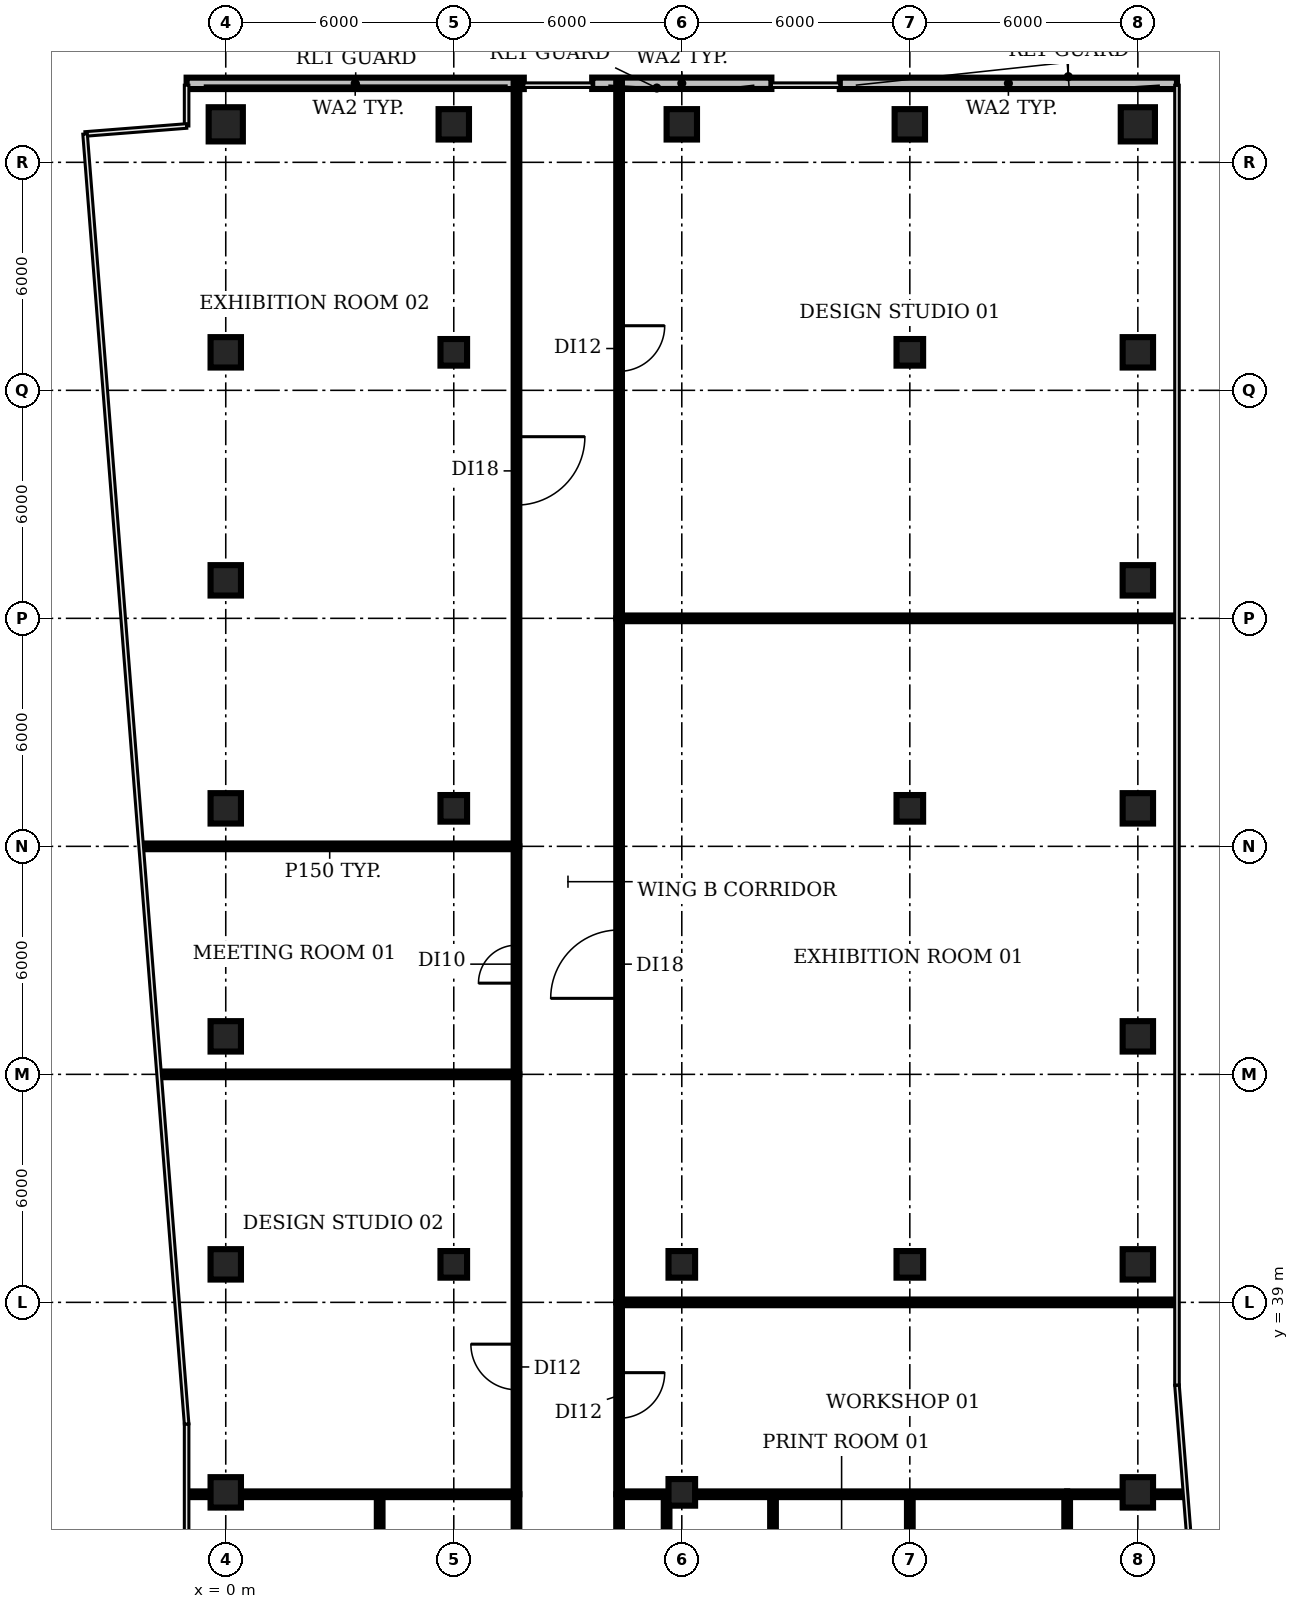
"""IFC4 building model, lengths in metres.
Left out: names, types, materials, properties, quantities, classifications, styles, units other than length and angle.
Written with IfcOpenShell. Run it as: python <this file> out.ifc"""

import sys

from ifc_helpers import new_model, si_unit, direction, frame, frame_2d, origin, origin_2d, place, context, subcontext, project, spatial, rectangle, circle, extrude, element, fill, save


model = new_model("IFC4")
c1 = context("Model", 3, precision=1e-05, world=origin(), true_north=direction((0.0, 1.0)))
c2 = subcontext(c1, "Body", "Model", "MODEL_VIEW")
j1 = project(units=[si_unit("LENGTHUNIT", "METRE"), si_unit("PLANEANGLEUNIT", "RADIAN")], contexts=[c1])
p1 = place(None, origin())
s1 = spatial("IfcSite", under=j1, at=p1, CompositionType="ELEMENT")
p2 = place(p1, origin())
s2 = spatial("IfcBuilding", under=s1, at=p2, CompositionType="ELEMENT")
p3 = place(p2, frame((0.0, 0.0, 209.6)))
s3 = spatial("IfcBuildingStorey", under=s2, at=p3, CompositionType="ELEMENT", Elevation=209.6)
for number, where, z_axis, x_axis in (
    (1, (0.0, 34.0, 0.0), (0.0, 0.0, 1.0), (1.0, 0.0, 0.0)),
    (2, (0.0, 40.0, 0.0), (0.0, 0.0, 1.0), (1.0, 0.0, 0.0)),
    (3, (0.0, 46.0, 0.0), (0.0, 0.0, 1.0), (1.0, 0.0, 0.0)),
    (4, (0.0, 52.0, 0.0), (0.0, 0.0, 1.0), (1.0, 0.0, 0.0)),
    (5, (0.0, 58.0, 0.0), (0.0, 0.0, 1.0), (1.0, 0.0, 0.0)),
    (6, (0.0, 64.0, 0.0), (0.0, 0.0, 1.0), (1.0, 0.0, 0.0)),
):
    element("IfcColumn", number, at=place(p3, frame(where, z_axis=z_axis, x_axis=x_axis)), inside=s3, PredefinedType="COLUMN", context=c2, shape_type="SweptSolid", body=[
        extrude(rectangle(XDim=0.8, YDim=0.8, at=origin_2d()), origin(), (0.0, 0.0, 1.0), 3.8),
    ])
p4 = place(p3, frame((0.0, 70.0, 0.0), z_axis=(0.0, 0.0, 1.0), x_axis=(1.0, 0.0, 0.0)))
e7 = element("IfcColumn", 7, at=p4, inside=s3, PredefinedType="COLUMN", context=c2, shape_type="SweptSolid", body=[
    extrude(circle(Radius=0.45, at=origin_2d()), origin(), (0.0, 0.0, 1.0), 3.8),
])
for number, where, z_axis, x_axis in (
    (8, (6.0, 40.0, 0.0), (0.0, 0.0, 1.0), (1.0, 0.0, 0.0)),
    (9, (6.0, 52.0, 0.0), (0.0, 0.0, 1.0), (1.0, 0.0, 0.0)),
    (10, (6.0, 64.0, 0.0), (0.0, 0.0, 1.0), (1.0, 0.0, 0.0)),
):
    element("IfcColumn", number, at=place(p3, frame(where, z_axis=z_axis, x_axis=x_axis)), inside=s3, PredefinedType="COLUMN", context=c2, shape_type="SweptSolid", body=[
        extrude(rectangle(XDim=0.7, YDim=0.7, at=origin_2d()), origin(), (0.0, 0.0, 1.0), 3.8),
    ])
p5 = place(p3, frame((6.0, 70.0, 0.0), z_axis=(0.0, 0.0, 1.0), x_axis=(1.0, 0.0, 0.0)))
e11 = element("IfcColumn", 11, at=p5, inside=s3, PredefinedType="COLUMN", context=c2, shape_type="SweptSolid", body=[
    extrude(rectangle(XDim=0.8, YDim=0.8, at=origin_2d()), origin(), (0.0, 0.0, 1.0), 3.8),
])
for number, where, z_axis, x_axis in (
    (12, (12.0, 34.0, 0.0), (0.0, 0.0, 1.0), (1.0, 0.0, 0.0)),
    (13, (12.0, 40.0, 0.0), (0.0, 0.0, 1.0), (1.0, 0.0, 0.0)),
):
    element("IfcColumn", number, at=place(p3, frame(where, z_axis=z_axis, x_axis=x_axis)), inside=s3, PredefinedType="COLUMN", context=c2, shape_type="SweptSolid", body=[
        extrude(rectangle(XDim=0.7, YDim=0.7, at=origin_2d()), origin(), (0.0, 0.0, 1.0), 3.8),
    ])
p6 = place(p3, frame((12.0, 70.0, 0.0), z_axis=(0.0, 0.0, 1.0), x_axis=(1.0, 0.0, 0.0)))
e14 = element("IfcColumn", 14, at=p6, inside=s3, PredefinedType="COLUMN", context=c2, shape_type="SweptSolid", body=[
    extrude(rectangle(XDim=0.8, YDim=0.8, at=origin_2d()), origin(), (0.0, 0.0, 1.0), 3.8),
])
for number, where, z_axis, x_axis in (
    (15, (18.0, 40.0, 0.0), (0.0, 0.0, 1.0), (1.0, 0.0, 0.0)),
    (16, (18.0, 52.0, 0.0), (0.0, 0.0, 1.0), (1.0, 0.0, 0.0)),
    (17, (18.0, 64.0, 0.0), (0.0, 0.0, 1.0), (1.0, 0.0, 0.0)),
):
    element("IfcColumn", number, at=place(p3, frame(where, z_axis=z_axis, x_axis=x_axis)), inside=s3, PredefinedType="COLUMN", context=c2, shape_type="SweptSolid", body=[
        extrude(rectangle(XDim=0.7, YDim=0.7, at=origin_2d()), origin(), (0.0, 0.0, 1.0), 3.8),
    ])
for number, where, z_axis, x_axis in (
    (18, (18.0, 70.0, 0.0), (0.0, 0.0, 1.0), (1.0, 0.0, 0.0)),
    (19, (24.0, 34.0, 0.0), (0.0, 0.0, 1.0), (1.0, 0.0, 0.0)),
    (20, (24.0, 40.0, 0.0), (0.0, 0.0, 1.0), (1.0, 0.0, 0.0)),
    (21, (24.0, 46.0, 0.0), (0.0, 0.0, 1.0), (1.0, 0.0, 0.0)),
    (22, (24.0, 52.0, 0.0), (0.0, 0.0, 1.0), (1.0, 0.0, 0.0)),
    (23, (24.0, 58.0, 0.0), (0.0, 0.0, 1.0), (1.0, 0.0, 0.0)),
    (24, (24.0, 64.0, 0.0), (0.0, 0.0, 1.0), (1.0, 0.0, 0.0)),
):
    element("IfcColumn", number, at=place(p3, frame(where, z_axis=z_axis, x_axis=x_axis)), inside=s3, PredefinedType="COLUMN", context=c2, shape_type="SweptSolid", body=[
        extrude(rectangle(XDim=0.8, YDim=0.8, at=origin_2d()), origin(), (0.0, 0.0, 1.0), 3.8),
    ])
p7 = place(p3, frame((24.0, 70.0, 0.0), z_axis=(0.0, 0.0, 1.0), x_axis=(1.0, 0.0, 0.0)))
e25 = element("IfcColumn", 25, at=p7, inside=s3, PredefinedType="COLUMN", context=c2, shape_type="SweptSolid", body=[
    extrude(circle(Radius=0.45, at=origin_2d()), origin(), (0.0, 0.0, 1.0), 3.8),
])
p8 = place(p3, frame((25.03, 71.078, 0.0), z_axis=(0.0, 0.0, 1.0), x_axis=(-1.0, 0.0, 0.0)))
e26 = element("IfcWall", 26, at=p8, inside=s3, PredefinedType="SOLIDWALL", context=c2, shape_type="SweptSolid", body=[
    extrude(rectangle(XDim=8.873, YDim=0.3, at=frame_2d((4.436, 0.0))), origin(), (0.0, 0.0, 1.0), 3.8),
])
p9 = place(p3, frame((14.357, 71.08, 0.0), z_axis=(0.0, 0.0, 1.0), x_axis=(-1.0, 0.0, 0.0)))
e27 = element("IfcWall", 27, at=p9, inside=s3, PredefinedType="SOLIDWALL", context=c2, shape_type="SweptSolid", body=[
    extrude(rectangle(XDim=4.715, YDim=0.3, at=frame_2d((2.357, 0.0))), origin(), (0.0, 0.0, 1.0), 3.8),
])
p10 = place(p3, frame((7.843, 71.078, 0.0), z_axis=(0.0, 0.0, 1.0), x_axis=(-1.0, 0.0, 0.0)))
e28 = element("IfcWall", 28, at=p10, inside=s3, PredefinedType="SOLIDWALL", context=c2, shape_type="SweptSolid", body=[
    extrude(rectangle(XDim=8.873, YDim=0.3, at=frame_2d((4.436, 0.0))), origin(), (0.0, 0.0, 1.0), 3.8),
])
p11 = place(p3, frame((-2.18, 51.0, 0.0), z_axis=(0.0, 0.0, 1.0), x_axis=(1.0, 0.0, 0.0)))
e29 = element("IfcWall", 29, at=p11, inside=s3, PredefinedType="PARTITIONING", context=c2, shape_type="SweptSolid", body=[
    extrude(rectangle(XDim=9.83, YDim=0.15, at=frame_2d((4.915, 0.0))), origin(), (0.0, 0.0, 1.0), 2.83),
])
p12 = place(p3, frame((-1.7, 45.0, 0.0), z_axis=(0.0, 0.0, 1.0), x_axis=(1.0, 0.0, 0.0)))
e30 = element("IfcWall", 30, at=p12, inside=s3, PredefinedType="PARTITIONING", context=c2, shape_type="SweptSolid", body=[
    extrude(rectangle(XDim=9.35, YDim=0.15, at=frame_2d((4.675, 0.0))), origin(), (0.0, 0.0, 1.0), 2.83),
])
p13 = place(p3, frame((-0.98, 33.95, 0.0), z_axis=(0.0, 0.0, 1.0), x_axis=(1.0, 0.0, 0.0)))
e31 = element("IfcWall", 31, at=p13, inside=s3, PredefinedType="PARTITIONING", context=c2, shape_type="SweptSolid", body=[
    extrude(rectangle(XDim=8.63, YDim=0.15, at=frame_2d((4.315, 0.0))), origin(), (0.0, 0.0, 1.0), 2.83),
])
p14 = place(p3, frame((4.05, 29.15, 0.0), z_axis=(0.0, 0.0, 1.0), x_axis=(0.0, 1.0, 0.0)))
e32 = element("IfcWall", 32, at=p14, inside=s3, PredefinedType="PARTITIONING", context=c2, shape_type="SweptSolid", body=[
    extrude(rectangle(XDim=4.8, YDim=0.15, at=frame_2d((2.4, 0.0))), origin(), (0.0, 0.0, 1.0), 2.83),
])
p15 = place(p3, frame((7.65, 29.15, 0.0), z_axis=(0.0, 0.0, 1.0), x_axis=(0.0, 1.0, 0.0)))
e33 = element("IfcWall", 33, at=p15, inside=s3, PredefinedType="PARTITIONING", context=c2, shape_type="SweptSolid", body=[
    extrude(rectangle(XDim=4.8, YDim=0.15, at=frame_2d((2.4, 0.0))), origin(), (0.0, 0.0, 1.0), 2.83),
])
p16 = place(p15, frame((1.9, 0.0, 0.0)))
e34 = element("IfcOpeningElement", 34, at=p16, cuts=e33, PredefinedType="OPENING", context=c2, shape_type="SweptSolid", body=[
    extrude(rectangle(XDim=0.9, YDim=2.1, at=frame_2d((0.45, 1.05))), frame((0.0, 0.085, 0.0), z_axis=(0.0, -1.0, 0.0), x_axis=(1.0, 0.0, 0.0)), (0.0, 0.0, 1.0), 0.17),
])
p17 = place(p3, frame((7.65, 33.95, 0.0), z_axis=(0.0, 0.0, 1.0), x_axis=(0.0, 1.0, 0.0)))
e35 = element("IfcWall", 35, at=p17, inside=s3, PredefinedType="PARTITIONING", context=c2, shape_type="SweptSolid", body=[
    extrude(rectangle(XDim=11.05, YDim=0.15, at=frame_2d((5.525, 0.0))), origin(), (0.0, 0.0, 1.0), 2.83),
])
p18 = place(p17, frame((2.75, 0.0, 0.0)))
e36 = element("IfcOpeningElement", 36, at=p18, cuts=e35, PredefinedType="OPENING", context=c2, shape_type="SweptSolid", body=[
    extrude(rectangle(XDim=1.2, YDim=2.1, at=frame_2d((0.6, 1.05))), frame((0.0, 0.085, 0.0), z_axis=(0.0, -1.0, 0.0), x_axis=(1.0, 0.0, 0.0)), (0.0, 0.0, 1.0), 0.17),
])
p19 = place(p3, frame((7.65, 45.0, 0.0), z_axis=(0.0, 0.0, 1.0), x_axis=(0.0, 1.0, 0.0)))
e37 = element("IfcWall", 37, at=p19, inside=s3, PredefinedType="PARTITIONING", context=c2, shape_type="SweptSolid", body=[
    extrude(rectangle(XDim=6.0, YDim=0.15, at=frame_2d((3.0, 0.0))), origin(), (0.0, 0.0, 1.0), 2.83),
])
p20 = place(p19, frame((2.4, 0.0, 0.0)))
e38 = element("IfcOpeningElement", 38, at=p20, cuts=e37, PredefinedType="OPENING", context=c2, shape_type="SweptSolid", body=[
    extrude(rectangle(XDim=1.0, YDim=2.1, at=frame_2d((0.5, 1.05))), frame((0.0, 0.085, 0.0), z_axis=(0.0, -1.0, 0.0), x_axis=(1.0, 0.0, 0.0)), (0.0, 0.0, 1.0), 0.17),
])
p21 = place(p3, frame((7.65, 71.09, 0.0), z_axis=(0.0, 0.0, 1.0), x_axis=(0.0, -1.0, 0.0)))
e39 = element("IfcWall", 39, at=p21, inside=s3, PredefinedType="PARTITIONING", context=c2, shape_type="SweptSolid", body=[
    extrude(rectangle(XDim=20.09, YDim=0.15, at=frame_2d((10.045, 0.0))), origin(), (0.0, 0.0, 1.0), 2.83),
])
p22 = place(p21, frame((9.31, 0.0, 0.0)))
e40 = element("IfcOpeningElement", 40, at=p22, cuts=e39, PredefinedType="OPENING", context=c2, shape_type="SweptSolid", body=[
    extrude(rectangle(XDim=1.8, YDim=2.1, at=frame_2d((0.9, 1.05))), frame((0.0, 0.085, 0.0), z_axis=(0.0, -1.0, 0.0), x_axis=(1.0, 0.0, 0.0)), (0.0, 0.0, 1.0), 0.17),
])
p23 = place(p3, frame((10.35, 29.15, 0.0), z_axis=(0.0, 0.0, 1.0), x_axis=(0.0, 1.0, 0.0)))
e41 = element("IfcWall", 41, at=p23, inside=s3, PredefinedType="PARTITIONING", context=c2, shape_type="SweptSolid", body=[
    extrude(rectangle(XDim=4.8, YDim=0.15, at=frame_2d((2.4, 0.0))), origin(), (0.0, 0.0, 1.0), 2.83),
])
p24 = place(p3, frame((10.35, 33.95, 0.0), z_axis=(0.0, 0.0, 1.0), x_axis=(1.0, 0.0, 0.0)))
e42 = element("IfcWall", 42, at=p24, inside=s3, PredefinedType="PARTITIONING", context=c2, shape_type="SweptSolid", body=[
    extrude(rectangle(XDim=1.242, YDim=0.15, at=frame_2d((0.621, 0.0))), origin(), (0.0, 0.0, 1.0), 2.83),
])
p25 = place(p3, frame((10.35, 39.0, 0.0), z_axis=(0.0, 0.0, 1.0), x_axis=(0.0, -1.0, 0.0)))
e43 = element("IfcWall", 43, at=p25, inside=s3, PredefinedType="PARTITIONING", context=c2, shape_type="SweptSolid", body=[
    extrude(rectangle(XDim=5.05, YDim=0.15, at=frame_2d((2.525, 0.0))), origin(), (0.0, 0.0, 1.0), 2.83),
])
p26 = place(p25, frame((1.85, 0.0, 0.0)))
e44 = element("IfcOpeningElement", 44, at=p26, cuts=e43, PredefinedType="OPENING", context=c2, shape_type="SweptSolid", body=[
    extrude(rectangle(XDim=1.2, YDim=2.1, at=frame_2d((0.6, 1.05))), frame((0.0, 0.085, 0.0), z_axis=(0.0, -1.0, 0.0), x_axis=(1.0, 0.0, 0.0)), (0.0, 0.0, 1.0), 0.17),
])
p27 = place(p3, frame((10.35, 39.0, 0.0), z_axis=(0.0, 0.0, 1.0), x_axis=(0.0, 1.0, 0.0)))
e45 = element("IfcWall", 45, at=p27, inside=s3, PredefinedType="PARTITIONING", context=c2, shape_type="SweptSolid", body=[
    extrude(rectangle(XDim=18.0, YDim=0.15, at=frame_2d((9.0, 0.0))), origin(), (0.0, 0.0, 1.0), 2.83),
])
p28 = place(p27, frame((8.0, 0.0, 0.0)))
e46 = element("IfcOpeningElement", 46, at=p28, cuts=e45, PredefinedType="OPENING", context=c2, shape_type="SweptSolid", body=[
    extrude(rectangle(XDim=1.8, YDim=2.1, at=frame_2d((0.9, 1.05))), frame((0.0, 0.085, 0.0), z_axis=(0.0, -1.0, 0.0), x_axis=(1.0, 0.0, 0.0)), (0.0, 0.0, 1.0), 0.17),
])
for number, where, z_axis, x_axis in (
    (47, (10.35, 39.0, 0.0), (0.0, 0.0, 1.0), (1.0, 0.0, 0.0)),
    (48, (10.35, 57.0, 0.0), (0.0, 0.0, 1.0), (1.0, 0.0, 0.0)),
):
    element("IfcWall", number, at=place(p3, frame(where, z_axis=z_axis, x_axis=x_axis)), inside=s3, PredefinedType="PARTITIONING", context=c2, shape_type="SweptSolid", body=[
        extrude(rectangle(XDim=14.63, YDim=0.15, at=frame_2d((7.315, 0.0))), origin(), (0.0, 0.0, 1.0), 2.83),
    ])
p29 = place(p3, frame((10.35, 71.09, 0.0), z_axis=(0.0, 0.0, 1.0), x_axis=(0.0, -1.0, 0.0)))
e49 = element("IfcWall", 49, at=p29, inside=s3, PredefinedType="PARTITIONING", context=c2, shape_type="SweptSolid", body=[
    extrude(rectangle(XDim=14.09, YDim=0.15, at=frame_2d((7.045, 0.0))), origin(), (0.0, 0.0, 1.0), 2.83),
])
p30 = place(p29, frame((6.39, 0.0, 0.0)))
e50 = element("IfcOpeningElement", 50, at=p30, cuts=e49, PredefinedType="OPENING", context=c2, shape_type="SweptSolid", body=[
    extrude(rectangle(XDim=1.2, YDim=2.1, at=frame_2d((0.6, 1.05))), frame((0.0, 0.085, 0.0), z_axis=(0.0, -1.0, 0.0), x_axis=(1.0, 0.0, 0.0)), (0.0, 0.0, 1.0), 0.17),
])
p31 = place(p3, frame((11.6, 29.15, 0.0), z_axis=(0.0, 0.0, 1.0), x_axis=(0.0, 1.0, 0.0)))
e51 = element("IfcWall", 51, at=p31, inside=s3, PredefinedType="PARTITIONING", context=c2, shape_type="SweptSolid", body=[
    extrude(rectangle(XDim=4.72, YDim=0.15, at=frame_2d((2.36, 0.0))), origin(), (0.0, 0.0, 1.0), 2.83),
])
p32 = place(p3, frame((11.696, 33.95, 0.0), z_axis=(0.0, 0.0, 1.0), x_axis=(1.0, 0.0, 0.0)))
e52 = element("IfcWall", 52, at=p32, inside=s3, PredefinedType="PARTITIONING", context=c2, shape_type="SweptSolid", body=[
    extrude(rectangle(XDim=0.621, YDim=0.15, at=frame_2d((0.311, 0.0))), origin(), (0.0, 0.0, 1.0), 2.83),
])
p33 = place(p3, frame((12.42, 33.95, 0.0), z_axis=(0.0, 0.0, 1.0), x_axis=(1.0, 0.0, 0.0)))
e53 = element("IfcWall", 53, at=p33, inside=s3, PredefinedType="PARTITIONING", context=c2, shape_type="SweptSolid", body=[
    extrude(rectangle(XDim=9.72, YDim=0.15, at=frame_2d((4.86, 0.0))), origin(), (0.0, 0.0, 1.0), 2.83),
])
p34 = place(p3, frame((14.4, 29.15, 0.0), z_axis=(0.0, 0.0, 1.0), x_axis=(0.0, 1.0, 0.0)))
e54 = element("IfcWall", 54, at=p34, inside=s3, PredefinedType="PARTITIONING", context=c2, shape_type="SweptSolid", body=[
    extrude(rectangle(XDim=4.8, YDim=0.15, at=frame_2d((2.4, 0.0))), origin(), (0.0, 0.0, 1.0), 2.83),
])
p35 = place(p3, frame((18.0, 28.0, 0.0), z_axis=(0.0, 0.0, 1.0), x_axis=(0.0, 1.0, 0.0)))
e55 = element("IfcWall", 55, at=p35, inside=s3, PredefinedType="PARTITIONING", context=c2, shape_type="SweptSolid", body=[
    extrude(rectangle(XDim=5.95, YDim=0.15, at=frame_2d((2.975, 0.0))), origin(), (0.0, 0.0, 1.0), 2.83),
])
p36 = place(p3, frame((22.14, 29.15, 0.0), z_axis=(0.0, 0.0, 1.0), x_axis=(0.0, 1.0, 0.0)))
e56 = element("IfcWall", 56, at=p36, inside=s3, PredefinedType="PARTITIONING", context=c2, shape_type="SweptSolid", body=[
    extrude(rectangle(XDim=4.8, YDim=0.15, at=frame_2d((2.4, 0.0))), origin(), (0.0, 0.0, 1.0), 2.83),
])
p37 = place(p3, frame((22.14, 33.95, 0.0), z_axis=(0.0, 0.0, 1.0), x_axis=(1.0, 0.0, 0.0)))
e57 = element("IfcWall", 57, at=p37, inside=s3, PredefinedType="PARTITIONING", context=c2, shape_type="SweptSolid", body=[
    extrude(rectangle(XDim=3.07, YDim=0.15, at=frame_2d((1.535, 0.0))), origin(), (0.0, 0.0, 1.0), 2.83),
])
p38 = place(p18, origin())
e58 = element("IfcDoor", 58, at=p38, inside=s3, OperationType="SINGLE_SWING_RIGHT", PredefinedType="DOOR", context=c2, shape_type="SweptSolid", body=[
    extrude(rectangle(XDim=1.2, YDim=2.1, at=frame_2d((0.6, 1.05))), frame((0.0, 0.025, 0.0), z_axis=(0.0, -1.0, 0.0), x_axis=(1.0, 0.0, 0.0)), (0.0, 0.0, 1.0), 0.05),
])
fill(e36, e58)
p39 = place(p20, origin())
e59 = element("IfcDoor", 59, at=p39, inside=s3, OperationType="SINGLE_SWING_LEFT", PredefinedType="DOOR", context=c2, shape_type="SweptSolid", body=[
    extrude(rectangle(XDim=1.0, YDim=2.1, at=frame_2d((0.5, 1.05))), frame((0.0, 0.025, 0.0), z_axis=(0.0, -1.0, 0.0), x_axis=(1.0, 0.0, 0.0)), (0.0, 0.0, 1.0), 0.05),
])
fill(e38, e59)
p40 = place(p22, origin())
e60 = element("IfcDoor", 60, at=p40, inside=s3, OperationType="SINGLE_SWING_LEFT", PredefinedType="DOOR", context=c2, shape_type="SweptSolid", body=[
    extrude(rectangle(XDim=1.8, YDim=2.1, at=frame_2d((0.9, 1.05))), frame((0.0, 0.025, 0.0), z_axis=(0.0, -1.0, 0.0), x_axis=(1.0, 0.0, 0.0)), (0.0, 0.0, 1.0), 0.05),
])
fill(e40, e60)
p41 = place(p26, origin())
e61 = element("IfcDoor", 61, at=p41, inside=s3, OperationType="SINGLE_SWING_LEFT", PredefinedType="DOOR", context=c2, shape_type="SweptSolid", body=[
    extrude(rectangle(XDim=1.2, YDim=2.1, at=frame_2d((0.6, 1.05))), frame((0.0, 0.025, 0.0), z_axis=(0.0, -1.0, 0.0), x_axis=(1.0, 0.0, 0.0)), (0.0, 0.0, 1.0), 0.05),
])
fill(e44, e61)
p42 = place(p28, origin())
e62 = element("IfcDoor", 62, at=p42, inside=s3, OperationType="SINGLE_SWING_LEFT", PredefinedType="DOOR", context=c2, shape_type="SweptSolid", body=[
    extrude(rectangle(XDim=1.8, YDim=2.1, at=frame_2d((0.9, 1.05))), frame((0.0, 0.025, 0.0), z_axis=(0.0, -1.0, 0.0), x_axis=(1.0, 0.0, 0.0)), (0.0, 0.0, 1.0), 0.05),
])
fill(e46, e62)
p43 = place(p30, origin())
e63 = element("IfcDoor", 63, at=p43, inside=s3, OperationType="SINGLE_SWING_LEFT", PredefinedType="DOOR", context=c2, shape_type="SweptSolid", body=[
    extrude(rectangle(XDim=1.2, YDim=2.1, at=frame_2d((0.6, 1.05))), frame((0.0, 0.025, 0.0), z_axis=(0.0, -1.0, 0.0), x_axis=(1.0, 0.0, 0.0)), (0.0, 0.0, 1.0), 0.05),
])
fill(e50, e63)
save(model, sys.argv[1])
